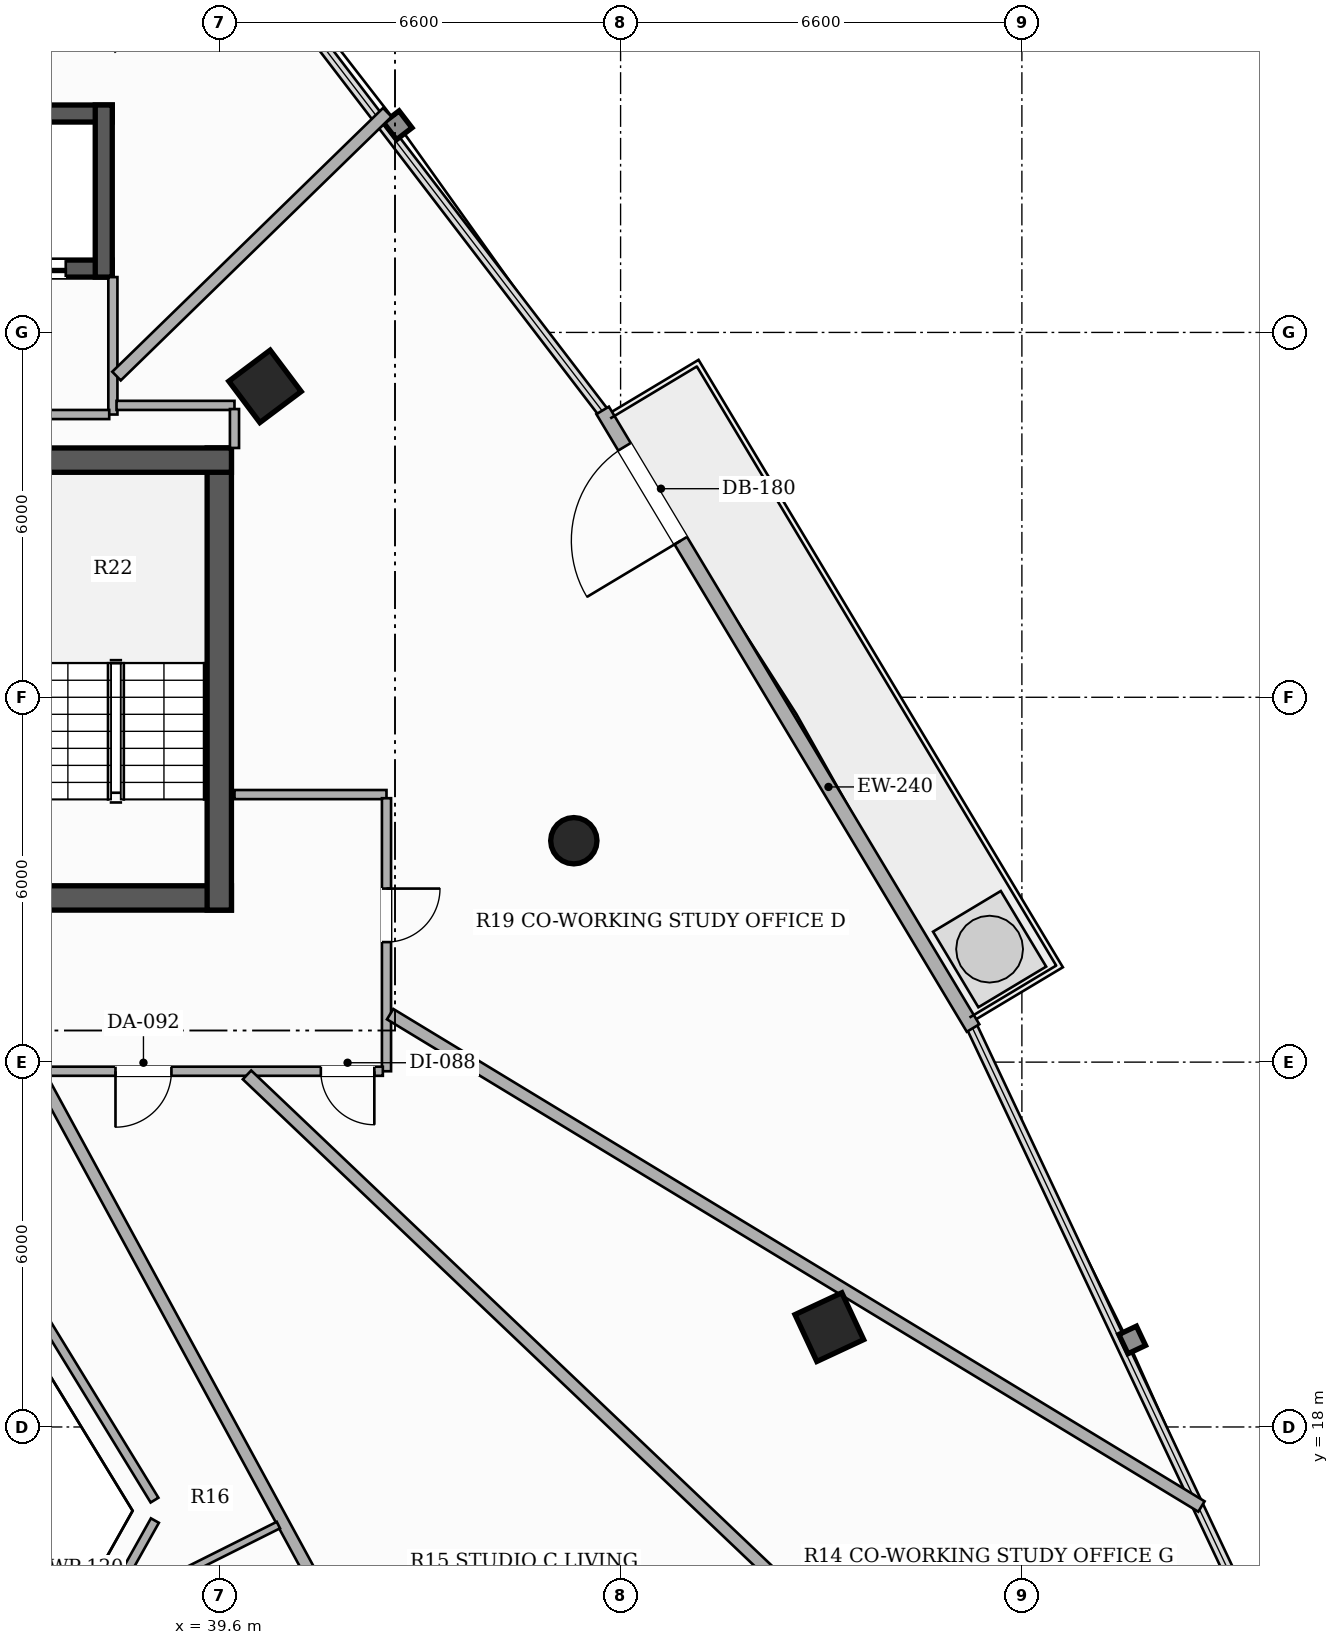
"""IFC4 building model, lengths in metres.
Left out: names, types, materials, properties, quantities, classifications, styles, units other than length and angle.
Written with IfcOpenShell. Run it as: python <this file> out.ifc"""

import sys

from ifc_helpers import new_model, si_unit, direction, frame, frame_2d, origin, origin_2d, place, context, subcontext, project, spatial, rectangle, hollow_rectangle, hollow_circle, extrude, element, fill, save


model = new_model("IFC4")
c1 = context("Model", 3, precision=1e-05, world=origin(), true_north=direction((0.0, 1.0)))
c2 = subcontext(c1, "Body", "Model", "MODEL_VIEW")
j1 = project(units=[si_unit("LENGTHUNIT", "METRE"), si_unit("PLANEANGLEUNIT", "RADIAN")], contexts=[c1])
p1 = place(None, origin())
s1 = spatial("IfcSite", under=j1, at=p1, CompositionType="ELEMENT")
p2 = place(p1, origin())
s2 = spatial("IfcBuilding", under=s1, at=p2, CompositionType="ELEMENT")
p3 = place(p2, frame((0.0, 0.0, 113.3)))
s3 = spatial("IfcBuildingStorey", under=s2, at=p3, CompositionType="ELEMENT", Elevation=113.3)
p4 = place(p3, frame((26.2, 26.7, 0.0), z_axis=(0.0, 0.0, 1.0), x_axis=(1.0, 0.0, 0.0)))
e1 = element("IfcWall", 1, at=p4, inside=s3, PredefinedType="SHEAR", context=c2, shape_type="SweptSolid", body=[
    extrude(rectangle(XDim=13.6, YDim=0.4, at=frame_2d((6.8, 0.0))), origin(), (0.0, 0.0, 1.0), 3.3),
])
p5 = place(p4, frame((4.35, 0.0, 0.0)))
e2 = element("IfcOpeningElement", 2, at=p5, cuts=e1, PredefinedType="OPENING", context=c2, shape_type="SweptSolid", body=[
    extrude(rectangle(XDim=1.05, YDim=2.15, at=frame_2d((0.525, 1.075))), frame((0.0, 0.21, 0.0), z_axis=(0.0, -1.0, 0.0), x_axis=(1.0, 0.0, 0.0)), (0.0, 0.0, 1.0), 0.42),
])
p6 = place(p4, frame((8.3, 0.0, 0.0)))
e3 = element("IfcOpeningElement", 3, at=p6, cuts=e1, PredefinedType="OPENING", context=c2, shape_type="SweptSolid", body=[
    extrude(rectangle(XDim=1.05, YDim=2.15, at=frame_2d((0.525, 1.075))), frame((0.0, 0.21, 0.0), z_axis=(0.0, -1.0, 0.0), x_axis=(1.0, 0.0, 0.0)), (0.0, 0.0, 1.0), 0.42),
])
p7 = place(p3, frame((39.6, 26.5, 0.0), z_axis=(0.0, 0.0, 1.0), x_axis=(0.0, 1.0, 0.0)))
e4 = element("IfcWall", 4, at=p7, inside=s3, PredefinedType="SHEAR", context=c2, shape_type="SweptSolid", body=[
    extrude(rectangle(XDim=7.6, YDim=0.4, at=frame_2d((3.8, 0.0))), origin(), (0.0, 0.0, 1.0), 3.3),
])
p8 = place(p3, frame((36.12, 33.9, 0.0), z_axis=(0.0, 0.0, 1.0), x_axis=(1.0, 0.0, 0.0)))
e5 = element("IfcWall", 5, at=p8, inside=s3, PredefinedType="SHEAR", context=c2, shape_type="SweptSolid", body=[
    extrude(rectangle(XDim=3.68, YDim=0.4, at=frame_2d((1.84, 0.0))), origin(), (0.0, 0.0, 1.0), 3.3),
])
p9 = place(p3, frame((37.84, 37.05, 0.0), z_axis=(0.0, 0.0, 1.0), x_axis=(-1.0, 0.0, 0.0)))
e6 = element("IfcWall", 6, at=p9, inside=s3, PredefinedType="SHEAR", context=c2, shape_type="SweptSolid", body=[
    extrude(rectangle(XDim=9.68, YDim=0.28, at=frame_2d((4.84, 0.0))), origin(), (0.0, 0.0, 1.0), 3.3),
])
p10 = place(p9, frame((7.815, 0.0, 0.0)))
e7 = element("IfcOpeningElement", 7, at=p10, cuts=e6, PredefinedType="OPENING", context=c2, shape_type="SweptSolid", body=[
    extrude(rectangle(XDim=1.1, YDim=2.2, at=frame_2d((0.55, 1.1))), frame((0.0, 0.15, 0.0), z_axis=(0.0, -1.0, 0.0), x_axis=(1.0, 0.0, 0.0)), (0.0, 0.0, 1.0), 0.3),
])
p11 = place(p9, frame((0.765, 0.0, 0.0)))
e8 = element("IfcOpeningElement", 8, at=p11, cuts=e6, PredefinedType="OPENING", context=c2, shape_type="SweptSolid", body=[
    extrude(rectangle(XDim=1.1, YDim=2.2, at=frame_2d((0.55, 1.1))), frame((0.0, 0.15, 0.0), z_axis=(0.0, -1.0, 0.0), x_axis=(1.0, 0.0, 0.0)), (0.0, 0.0, 1.0), 0.3),
])
p12 = place(p3, frame((28.16, 39.6, 0.0), z_axis=(0.0, 0.0, 1.0), x_axis=(1.0, 0.0, 0.0)))
e9 = element("IfcWall", 9, at=p12, inside=s3, PredefinedType="SHEAR", context=c2, shape_type="SweptSolid", body=[
    extrude(rectangle(XDim=9.68, YDim=0.28, at=frame_2d((4.84, 0.0))), origin(), (0.0, 0.0, 1.0), 3.3),
])
p13 = place(p3, frame((37.7, 36.91, 0.0), z_axis=(0.0, 0.0, 1.0), x_axis=(0.0, 1.0, 0.0)))
e10 = element("IfcWall", 10, at=p13, inside=s3, PredefinedType="SHEAR", context=c2, shape_type="SweptSolid", body=[
    extrude(rectangle(XDim=2.83, YDim=0.28, at=frame_2d((1.415, 0.0))), origin(), (0.0, 0.0, 1.0), 3.3),
])
p14 = place(p3, frame((49.633, 19.642, 0.0), z_axis=(0.0, 0.0, 1.0), x_axis=(-0.422618261741, 0.906307787037, 0.0)))
e11 = element("IfcColumn", 11, at=p14, inside=s3, PredefinedType="COLUMN", context=c2, shape_type="SweptSolid", body=[
    extrude(hollow_rectangle(XDim=0.85, YDim=0.85, WallThickness=0.028, at=origin_2d()), origin(), (0.0, 0.0, 1.0), 3.3),
])
p15 = place(p3, frame((45.431, 27.641, 0.0), z_axis=(0.0, 0.0, 1.0), x_axis=(1.0, 0.0, 0.0)))
e12 = element("IfcColumn", 12, at=p15, inside=s3, PredefinedType="COLUMN", context=c2, shape_type="SweptSolid", body=[
    extrude(hollow_circle(Radius=0.381, WallThickness=0.022, at=origin_2d()), origin(), (0.0, 0.0, 1.0), 3.3),
])
p16 = place(p3, frame((40.352, 35.113, 0.0), z_axis=(0.0, 0.0, 1.0), x_axis=(-0.600420225326, 0.799684658487, 0.0)))
e13 = element("IfcColumn", 13, at=p16, inside=s3, PredefinedType="COLUMN", context=c2, shape_type="SweptSolid", body=[
    extrude(hollow_rectangle(XDim=0.85, YDim=0.85, WallThickness=0.028, at=origin_2d()), origin(), (0.0, 0.0, 1.0), 3.3),
])
p17 = place(p3, frame((51.997, 24.561, 0.0), z_axis=(0.0, 0.0, 1.0), x_axis=(-0.514362369366, 0.857572943242, 0.0)))
e14 = element("IfcWall", 14, at=p17, inside=s3, PredefinedType="SOLIDWALL", context=c2, shape_type="SweptSolid", body=[
    extrude(rectangle(XDim=11.844, YDim=0.24, at=frame_2d((5.922, 0.0))), origin(), (0.0, 0.0, 1.0), 2.624),
])
p18 = place(p17, frame((9.346, 0.0, 0.0)))
e15 = element("IfcOpeningElement", 15, at=p18, cuts=e14, PredefinedType="OPENING", context=c2, shape_type="SweptSolid", body=[
    extrude(rectangle(XDim=1.8, YDim=2.2, at=frame_2d((0.9, 1.1))), frame((0.0, 0.13, 0.0), z_axis=(0.0, -1.0, 0.0), x_axis=(1.0, 0.0, 0.0)), (0.0, 0.0, 1.0), 0.26),
])
p19 = place(p3, frame((37.85, 34.65, 0.0), z_axis=(0.0, 0.0, 1.0), x_axis=(0.0, 1.0, 0.0)))
e16 = element("IfcWall", 16, at=p19, inside=s3, PredefinedType="PARTITIONING", context=c2, shape_type="SweptSolid", body=[
    extrude(rectangle(XDim=2.26, YDim=0.15, at=frame_2d((1.13, 0.0))), origin(), (0.0, 0.0, 1.0), 3.06),
])
p20 = place(p3, frame((36.385, 34.65, 0.0), z_axis=(0.0, 0.0, 1.0), x_axis=(1.0, 0.0, 0.0)))
e17 = element("IfcWall", 17, at=p20, inside=s3, PredefinedType="PARTITIONING", context=c2, shape_type="SweptSolid", body=[
    extrude(rectangle(XDim=1.405, YDim=0.15, at=frame_2d((0.703, 0.0))), origin(), (0.0, 0.0, 1.0), 2.425),
])
p21 = place(p3, frame((39.85, 28.4, 0.0), z_axis=(0.0, 0.0, 1.0), x_axis=(1.0, 0.0, 0.0)))
e18 = element("IfcWall", 18, at=p21, inside=s3, PredefinedType="PARTITIONING", context=c2, shape_type="SweptSolid", body=[
    extrude(rectangle(XDim=2.5, YDim=0.15, at=frame_2d((1.25, 0.0))), origin(), (0.0, 0.0, 1.0), 2.721),
])
p22 = place(p3, frame((42.35, 28.34, 0.0), z_axis=(0.0, 0.0, 1.0), x_axis=(0.0, -1.0, 0.0)))
e19 = element("IfcWall", 19, at=p22, inside=s3, PredefinedType="PARTITIONING", context=c2, shape_type="SweptSolid", body=[
    extrude(rectangle(XDim=4.49, YDim=0.15, at=frame_2d((2.245, 0.0))), origin(), (0.0, 0.0, 1.0), 2.721),
])
p23 = place(p22, frame((1.486, 0.0, 0.0)))
e20 = element("IfcOpeningElement", 20, at=p23, cuts=e19, PredefinedType="OPENING", context=c2, shape_type="SweptSolid", body=[
    extrude(rectangle(XDim=0.88, YDim=2.1, at=frame_2d((0.44, 1.05))), frame((0.0, 0.085, 0.0), z_axis=(0.0, -1.0, 0.0), x_axis=(1.0, 0.0, 0.0)), (0.0, 0.0, 1.0), 0.17),
])
p24 = place(p3, frame((42.29, 23.85, 0.0), z_axis=(0.0, 0.0, 1.0), x_axis=(-1.0, 0.0, 0.0)))
e21 = element("IfcWall", 21, at=p24, inside=s3, PredefinedType="PARTITIONING", context=c2, shape_type="SweptSolid", body=[
    extrude(rectangle(XDim=8.065, YDim=0.15, at=frame_2d((4.032, 0.0))), origin(), (0.0, 0.0, 1.0), 2.492),
])
p25 = place(p24, frame((3.477, 0.0, 0.0)))
e22 = element("IfcOpeningElement", 22, at=p25, cuts=e21, PredefinedType="OPENING", context=c2, shape_type="SweptSolid", body=[
    extrude(rectangle(XDim=0.92, YDim=2.15, at=frame_2d((0.46, 1.075))), frame((0.0, 0.085, 0.0), z_axis=(0.0, -1.0, 0.0), x_axis=(1.0, 0.0, 0.0)), (0.0, 0.0, 1.0), 0.17),
])
p26 = place(p24, frame((0.14, 0.0, 0.0)))
e23 = element("IfcOpeningElement", 23, at=p26, cuts=e21, PredefinedType="OPENING", context=c2, shape_type="SweptSolid", body=[
    extrude(rectangle(XDim=0.88, YDim=2.1, at=frame_2d((0.44, 1.05))), frame((0.0, 0.085, 0.0), z_axis=(0.0, -1.0, 0.0), x_axis=(1.0, 0.0, 0.0)), (0.0, 0.0, 1.0), 0.17),
])
p27 = place(p3, frame((37.91, 34.8, 0.0), z_axis=(0.0, 0.0, 1.0), x_axis=(1.0, 0.0, 0.0)))
e24 = element("IfcWall", 24, at=p27, inside=s3, PredefinedType="PARTITIONING", context=c2, shape_type="SweptSolid", body=[
    extrude(rectangle(XDim=1.94, YDim=0.15, at=frame_2d((0.97, 0.0))), origin(), (0.0, 0.0, 1.0), 2.721),
])
p28 = place(p3, frame((39.85, 34.74, 0.0), z_axis=(0.0, 0.0, 1.0), x_axis=(0.0, -1.0, 0.0)))
e25 = element("IfcWall", 25, at=p28, inside=s3, PredefinedType="PARTITIONING", context=c2, shape_type="SweptSolid", body=[
    extrude(rectangle(XDim=0.64, YDim=0.15, at=frame_2d((0.32, 0.0))), origin(), (0.0, 0.0, 1.0), 2.721),
])
p29 = place(p3, frame((34.257, 23.79, 0.0), z_axis=(0.0, 0.0, 1.0), x_axis=(0.521839061235, -0.853043957935, 0.0)))
e26 = element("IfcWall", 26, at=p29, inside=s3, PredefinedType="PARTITIONING", context=c2, shape_type="SweptSolid", body=[
    extrude(rectangle(XDim=8.198, YDim=0.15, at=frame_2d((4.099, 0.0))), origin(), (0.0, 0.0, 1.0), 2.721),
])
p30 = place(p3, frame((38.541, 16.461, 0.0), z_axis=(0.0, 0.0, 1.0), x_axis=(-0.488631416095, -0.872490308946, 0.0)))
e27 = element("IfcWall", 27, at=p30, inside=s3, PredefinedType="PARTITIONING", context=c2, shape_type="SweptSolid", body=[
    extrude(rectangle(XDim=1.06, YDim=0.15, at=frame_2d((0.53, 0.0))), origin(), (0.0, 0.0, 1.0), 3.06),
])
p31 = place(p3, frame((36.646, 23.79, 0.0), z_axis=(0.0, 0.0, 1.0), x_axis=(0.477391569207, -0.878690667784, 0.0)))
e28 = element("IfcWall", 28, at=p31, inside=s3, PredefinedType="PARTITIONING", context=c2, shape_type="SweptSolid", body=[
    extrude(rectangle(XDim=22.918, YDim=0.2, at=frame_2d((11.459, 0.0))), origin(), (0.0, 0.0, 1.0), 2.413),
])
p32 = place(p3, frame((40.056, 23.79, 0.0), z_axis=(0.0, 0.0, 1.0), x_axis=(0.724633427165, -0.68913452695, 0.0)))
e29 = element("IfcWall", 29, at=p32, inside=s3, PredefinedType="PARTITIONING", context=c2, shape_type="SweptSolid", body=[
    extrude(rectangle(XDim=25.921, YDim=0.2, at=frame_2d((12.96, 0.0))), origin(), (0.0, 0.0, 1.0), 2.413),
])
p33 = place(p3, frame((37.91, 35.282, 0.0), z_axis=(0.0, 0.0, 1.0), x_axis=(0.716392659664, 0.697697324905, 0.0)))
e30 = element("IfcWall", 30, at=p33, inside=s3, PredefinedType="PARTITIONING", context=c2, shape_type="SweptSolid", body=[
    extrude(rectangle(XDim=6.216, YDim=0.2, at=frame_2d((3.108, 0.0))), origin(), (0.0, 0.0, 1.0), 2.413),
])
p34 = place(p3, frame((55.753, 16.692, 0.0), z_axis=(0.0, 0.0, 1.0), x_axis=(-0.85489976131, 0.518793213248, 0.0)))
e31 = element("IfcWall", 31, at=p34, inside=s3, PredefinedType="PARTITIONING", context=c2, shape_type="SweptSolid", body=[
    extrude(rectangle(XDim=15.608, YDim=0.2, at=frame_2d((7.804, 0.0))), origin(), (0.0, 0.0, 1.0), 2.413),
])
p35 = place(p3, frame((40.572, 16.387, 0.0), z_axis=(0.0, 0.0, 1.0), x_axis=(-0.894178861749, -0.447709909653, 0.0)))
e32 = element("IfcWall", 32, at=p35, inside=s3, PredefinedType="PARTITIONING", context=c2, shape_type="SweptSolid", body=[
    extrude(rectangle(XDim=7.083, YDim=0.12, at=frame_2d((3.541, 0.0))), origin(), (0.0, 0.0, 1.0), 2.721),
])
p36 = place(p18, origin())
e33 = element("IfcDoor", 33, at=p36, inside=s3, OperationType="SINGLE_SWING_LEFT", PredefinedType="DOOR", context=c2, shape_type="SweptSolid", body=[
    extrude(rectangle(XDim=1.8, YDim=2.2, at=frame_2d((0.9, 1.1))), frame((0.0, 0.025, 0.0), z_axis=(0.0, -1.0, 0.0), x_axis=(1.0, 0.0, 0.0)), (0.0, 0.0, 1.0), 0.05),
])
fill(e15, e33)
p37 = place(p11, origin())
e34 = element("IfcDoor", 34, at=p37, inside=s3, OperationType="DOUBLE_DOOR_SLIDING", PredefinedType="DOOR", context=c2, shape_type="SweptSolid", body=[
    extrude(rectangle(XDim=1.1, YDim=2.2, at=frame_2d((0.55, 1.1))), frame((0.0, 0.025, 0.0), z_axis=(0.0, -1.0, 0.0), x_axis=(1.0, 0.0, 0.0)), (0.0, 0.0, 1.0), 0.05),
])
fill(e8, e34)
p38 = place(p25, origin())
e35 = element("IfcDoor", 35, at=p38, inside=s3, OperationType="SINGLE_SWING_RIGHT", PredefinedType="DOOR", context=c2, shape_type="SweptSolid", body=[
    extrude(rectangle(XDim=0.92, YDim=2.15, at=frame_2d((0.46, 1.075))), frame((0.0, 0.025, 0.0), z_axis=(0.0, -1.0, 0.0), x_axis=(1.0, 0.0, 0.0)), (0.0, 0.0, 1.0), 0.05),
])
fill(e22, e35)
p39 = place(p23, origin())
e36 = element("IfcDoor", 36, at=p39, inside=s3, OperationType="SINGLE_SWING_LEFT", PredefinedType="DOOR", context=c2, shape_type="SweptSolid", body=[
    extrude(rectangle(XDim=0.88, YDim=2.1, at=frame_2d((0.44, 1.05))), frame((0.0, 0.025, 0.0), z_axis=(0.0, -1.0, 0.0), x_axis=(1.0, 0.0, 0.0)), (0.0, 0.0, 1.0), 0.05),
])
fill(e20, e36)
p40 = place(p26, origin())
e37 = element("IfcDoor", 37, at=p40, inside=s3, OperationType="SINGLE_SWING_LEFT", PredefinedType="DOOR", context=c2, shape_type="SweptSolid", body=[
    extrude(rectangle(XDim=0.88, YDim=2.1, at=frame_2d((0.44, 1.05))), frame((0.0, 0.025, 0.0), z_axis=(0.0, -1.0, 0.0), x_axis=(1.0, 0.0, 0.0)), (0.0, 0.0, 1.0), 0.05),
])
fill(e23, e37)
save(model, sys.argv[1])
